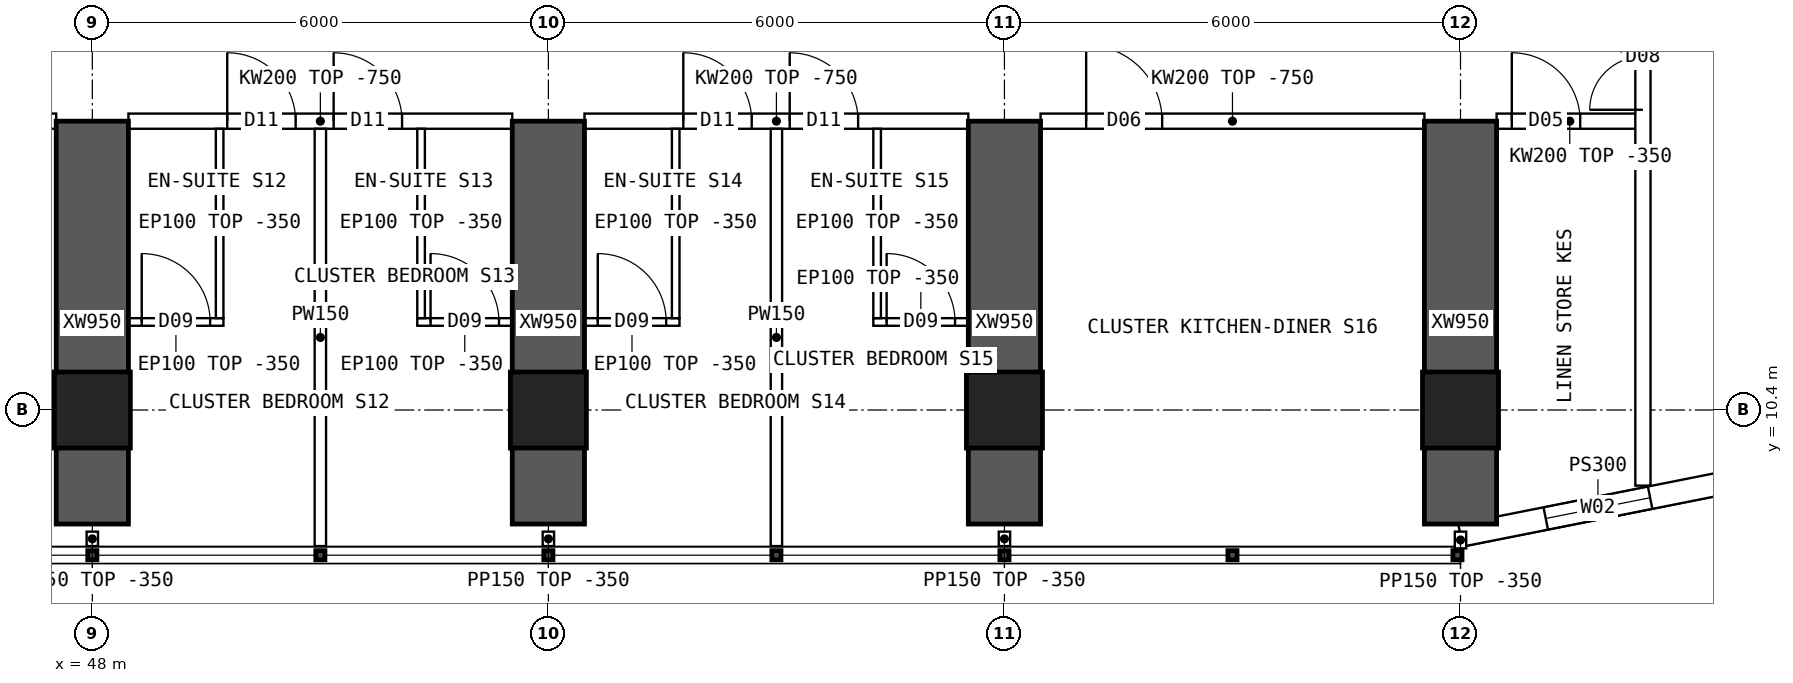
"""IFC4 building model, lengths in metres.
Left out: names, types, materials, properties, quantities, classifications, styles, units other than length and angle.
Written with IfcOpenShell. Run it as: python <this file> out.ifc"""

import sys

from ifc_helpers import new_model, si_unit, direction, frame, frame_2d, origin, origin_2d, place, context, subcontext, project, spatial, polyline, rectangle, hollow_rectangle, outline, extrude, element, fill, save


model = new_model("IFC4")
c1 = context("Model", 3, precision=1e-05, world=origin(), true_north=direction((0.0, 1.0)))
c2 = subcontext(c1, "Body", "Model", "MODEL_VIEW")
j1 = project(units=[si_unit("LENGTHUNIT", "METRE"), si_unit("PLANEANGLEUNIT", "RADIAN")], contexts=[c1])
p1 = place(None, origin())
s1 = spatial("IfcSite", under=j1, at=p1, CompositionType="ELEMENT")
p2 = place(p1, origin())
s2 = spatial("IfcBuilding", under=s1, at=p2, CompositionType="ELEMENT")
p3 = place(p2, frame((0.0, 0.0, 129.4)))
s3 = spatial("IfcBuildingStorey", under=s2, at=p3, CompositionType="ELEMENT", Elevation=129.4)
for number, where, z_axis, x_axis in (
    (1, (48.0, 10.4, 0.0), (0.0, 0.0, 1.0), (1.0, 0.0, 0.0)),
    (2, (54.0, 10.4, 0.0), (0.0, 0.0, 1.0), (1.0, 0.0, 0.0)),
    (3, (60.0, 10.4, 0.0), (0.0, 0.0, 1.0), (1.0, 0.0, 0.0)),
    (4, (66.0, 10.4, 0.0), (0.0, 0.0, 1.0), (1.0, 0.0, 0.0)),
):
    element("IfcColumn", number, at=place(p3, frame(where, z_axis=z_axis, x_axis=x_axis)), inside=s3, PredefinedType="COLUMN", context=c2, shape_type="SweptSolid", body=[
        extrude(hollow_rectangle(XDim=1.0, YDim=1.0, WallThickness=0.1, at=origin_2d()), origin(), (0.0, 0.0, 1.0), 3.75),
    ])
for number, where, z_axis, x_axis in (
    (5, (48.0, 8.9, 0.0), (0.0, 0.0, 1.0), (0.0, 1.0, 0.0)),
    (6, (54.0, 8.9, 0.0), (0.0, 0.0, 1.0), (0.0, 1.0, 0.0)),
    (7, (60.0, 8.9, 0.0), (0.0, 0.0, 1.0), (0.0, 1.0, 0.0)),
    (8, (66.0, 8.9, 0.0), (0.0, 0.0, 1.0), (0.0, 1.0, 0.0)),
):
    element("IfcWall", number, at=place(p3, frame(where, z_axis=z_axis, x_axis=x_axis)), inside=s3, PredefinedType="SHEAR", context=c2, shape_type="SweptSolid", body=[
        extrude(rectangle(XDim=5.3, YDim=0.95, at=frame_2d((2.65, 0.0))), origin(), (0.0, 0.0, 1.0), 3.75),
    ])
p4 = place(p3, frame((66.0, 8.75, 0.0), z_axis=(0.0, 0.0, 1.0), x_axis=(0.980791473772, 0.195059183267, 0.0)))
e9 = element("IfcWall", 9, at=p4, inside=s3, PredefinedType="SOLIDWALL", context=c2, shape_type="SweptSolid", body=[
    extrude(outline(polyline([(-0.03, -0.15), (3.717, -0.15), (3.657, 0.15), (0.03, 0.15), (-0.03, -0.15)])), origin(), (0.0, 0.0, 1.0), 3.4),
])
p5 = place(p4, frame((1.144, 0.0, 0.9)))
e10 = element("IfcOpeningElement", 10, at=p5, cuts=e9, PredefinedType="OPENING", context=c2, shape_type="SweptSolid", body=[
    extrude(rectangle(XDim=1.4, YDim=1.8, at=frame_2d((0.7, 0.9))), frame((0.0, 0.16, 0.0), z_axis=(0.0, -1.0, 0.0), x_axis=(1.0, 0.0, 0.0)), (0.0, 0.0, 1.0), 0.32),
])
p6 = place(p3, frame((42.475, 14.2, 0.0), z_axis=(0.0, 0.0, 1.0), x_axis=(1.0, 0.0, 0.0)))
e11 = element("IfcWall", 11, at=p6, inside=s3, PredefinedType="SOLIDWALL", context=c2, shape_type="SweptSolid", body=[
    extrude(outline(polyline([(0.0, 0.0), (5.05, 0.0), (5.05, 3.0), (0.0, 3.0), (0.0, 0.0)])), frame((0.0, 0.1, 0.0), z_axis=(0.0, -1.0, 0.0), x_axis=(1.0, 0.0, 0.0)), (0.0, 0.0, 1.0), 0.2),
])
p7 = place(p6, frame((0.6, 0.0, 0.0)))
e12 = element("IfcOpeningElement", 12, at=p7, cuts=e11, PredefinedType="OPENING", context=c2, shape_type="SweptSolid", body=[
    extrude(rectangle(XDim=1.0, YDim=2.1, at=frame_2d((0.5, 1.05))), frame((0.0, 0.11, 0.0), z_axis=(0.0, -1.0, 0.0), x_axis=(1.0, 0.0, 0.0)), (0.0, 0.0, 1.0), 0.22),
])
p8 = place(p3, frame((48.475, 14.2, 0.0), z_axis=(0.0, 0.0, 1.0), x_axis=(1.0, 0.0, 0.0)))
e13 = element("IfcWall", 13, at=p8, inside=s3, PredefinedType="SOLIDWALL", context=c2, shape_type="SweptSolid", body=[
    extrude(outline(polyline([(0.0, 0.0), (5.05, 0.0), (5.05, 3.0), (0.0, 3.0), (0.0, 0.0)])), frame((0.0, 0.1, 0.0), z_axis=(0.0, -1.0, 0.0), x_axis=(1.0, 0.0, 0.0)), (0.0, 0.0, 1.0), 0.2),
])
p9 = place(p8, frame((1.3, 0.0, 0.0)))
e14 = element("IfcOpeningElement", 14, at=p9, cuts=e13, PredefinedType="OPENING", context=c2, shape_type="SweptSolid", body=[
    extrude(rectangle(XDim=0.9, YDim=2.1, at=frame_2d((0.45, 1.05))), frame((0.0, 0.11, 0.0), z_axis=(0.0, -1.0, 0.0), x_axis=(1.0, 0.0, 0.0)), (0.0, 0.0, 1.0), 0.22),
])
p10 = place(p8, frame((2.7, 0.0, 0.0)))
e15 = element("IfcOpeningElement", 15, at=p10, cuts=e13, PredefinedType="OPENING", context=c2, shape_type="SweptSolid", body=[
    extrude(rectangle(XDim=0.9, YDim=2.1, at=frame_2d((0.45, 1.05))), frame((0.0, 0.11, 0.0), z_axis=(0.0, -1.0, 0.0), x_axis=(1.0, 0.0, 0.0)), (0.0, 0.0, 1.0), 0.22),
])
p11 = place(p3, frame((54.475, 14.2, 0.0), z_axis=(0.0, 0.0, 1.0), x_axis=(1.0, 0.0, 0.0)))
e16 = element("IfcWall", 16, at=p11, inside=s3, PredefinedType="SOLIDWALL", context=c2, shape_type="SweptSolid", body=[
    extrude(outline(polyline([(0.0, 0.0), (5.05, 0.0), (5.05, 3.0), (0.0, 3.0), (0.0, 0.0)])), frame((0.0, 0.1, 0.0), z_axis=(0.0, -1.0, 0.0), x_axis=(1.0, 0.0, 0.0)), (0.0, 0.0, 1.0), 0.2),
])
p12 = place(p11, frame((1.3, 0.0, 0.0)))
e17 = element("IfcOpeningElement", 17, at=p12, cuts=e16, PredefinedType="OPENING", context=c2, shape_type="SweptSolid", body=[
    extrude(rectangle(XDim=0.9, YDim=2.1, at=frame_2d((0.45, 1.05))), frame((0.0, 0.11, 0.0), z_axis=(0.0, -1.0, 0.0), x_axis=(1.0, 0.0, 0.0)), (0.0, 0.0, 1.0), 0.22),
])
p13 = place(p11, frame((2.7, 0.0, 0.0)))
e18 = element("IfcOpeningElement", 18, at=p13, cuts=e16, PredefinedType="OPENING", context=c2, shape_type="SweptSolid", body=[
    extrude(rectangle(XDim=0.9, YDim=2.1, at=frame_2d((0.45, 1.05))), frame((0.0, 0.11, 0.0), z_axis=(0.0, -1.0, 0.0), x_axis=(1.0, 0.0, 0.0)), (0.0, 0.0, 1.0), 0.22),
])
p14 = place(p3, frame((60.475, 14.2, 0.0), z_axis=(0.0, 0.0, 1.0), x_axis=(1.0, 0.0, 0.0)))
e19 = element("IfcWall", 19, at=p14, inside=s3, PredefinedType="SOLIDWALL", context=c2, shape_type="SweptSolid", body=[
    extrude(outline(polyline([(0.0, 0.0), (5.05, 0.0), (5.05, 3.0), (0.0, 3.0), (0.0, 0.0)])), frame((0.0, 0.1, 0.0), z_axis=(0.0, -1.0, 0.0), x_axis=(1.0, 0.0, 0.0)), (0.0, 0.0, 1.0), 0.2),
])
p15 = place(p14, frame((0.6, 0.0, 0.0)))
e20 = element("IfcOpeningElement", 20, at=p15, cuts=e19, PredefinedType="OPENING", context=c2, shape_type="SweptSolid", body=[
    extrude(rectangle(XDim=1.0, YDim=2.1, at=frame_2d((0.5, 1.05))), frame((0.0, 0.11, 0.0), z_axis=(0.0, -1.0, 0.0), x_axis=(1.0, 0.0, 0.0)), (0.0, 0.0, 1.0), 0.22),
])
p16 = place(p3, frame((66.475, 14.2, 0.0), z_axis=(0.0, 0.0, 1.0), x_axis=(1.0, 0.0, 0.0)))
e21 = element("IfcWall", 21, at=p16, inside=s3, PredefinedType="SOLIDWALL", context=c2, shape_type="SweptSolid", body=[
    extrude(rectangle(XDim=1.925, YDim=0.2, at=frame_2d((0.962, 0.0))), origin(), (0.0, 0.0, 1.0), 3.4),
])
p17 = place(p16, frame((0.2, 0.0, 0.0)))
e22 = element("IfcOpeningElement", 22, at=p17, cuts=e21, PredefinedType="OPENING", context=c2, shape_type="SweptSolid", body=[
    extrude(rectangle(XDim=0.9, YDim=2.1, at=frame_2d((0.45, 1.05))), frame((0.0, 0.11, 0.0), z_axis=(0.0, -1.0, 0.0), x_axis=(1.0, 0.0, 0.0)), (0.0, 0.0, 1.0), 0.22),
])
p18 = place(p3, frame((51.0, 8.61, 0.0), z_axis=(0.0, 0.0, 1.0), x_axis=(0.0, 1.0, 0.0)))
e23 = element("IfcWall", 23, at=p18, inside=s3, PredefinedType="PARTITIONING", context=c2, shape_type="SweptSolid", body=[
    extrude(outline(polyline([(0.0, 0.0), (5.49, 0.0), (5.49, 3.0), (5.442, 3.0), (5.44, 3.4), (1.992, 3.4), (1.99, 3.0), (1.592, 3.0), (1.59, 3.4), (0.0, 3.4), (0.0, 0.0)])), frame((0.0, 0.075, 0.0), z_axis=(0.0, -1.0, 0.0), x_axis=(1.0, 0.0, 0.0)), (0.0, 0.0, 1.0), 0.15),
])
p19 = place(p3, frame((49.725, 11.558, 0.0), z_axis=(0.0, 0.0, 1.0), x_axis=(-1.0, 0.0, 0.0)))
e24 = element("IfcWall", 24, at=p19, inside=s3, PredefinedType="PARTITIONING", context=c2, shape_type="SweptSolid", body=[
    extrude(rectangle(XDim=1.25, YDim=0.1, at=frame_2d((0.625, 0.0))), origin(), (0.0, 0.0, 1.0), 3.4),
])
p20 = place(p19, frame((0.175, 0.0, 0.0)))
e25 = element("IfcOpeningElement", 25, at=p20, cuts=e24, PredefinedType="OPENING", context=c2, shape_type="SweptSolid", body=[
    extrude(rectangle(XDim=0.9, YDim=2.1, at=frame_2d((0.45, 1.05))), frame((0.0, 0.06, 0.0), z_axis=(0.0, -1.0, 0.0), x_axis=(1.0, 0.0, 0.0)), (0.0, 0.0, 1.0), 0.12),
])
p21 = place(p3, frame((49.675, 11.608, 0.0), z_axis=(0.0, 0.0, 1.0), x_axis=(0.0, 1.0, 0.0)))
e26 = element("IfcWall", 26, at=p21, inside=s3, PredefinedType="PARTITIONING", context=c2, shape_type="SweptSolid", body=[
    extrude(outline(polyline([(0.0, 0.0), (2.492, 0.0), (2.492, 3.0), (2.444, 3.0), (2.442, 3.4), (0.0, 3.4), (0.0, 0.0)])), frame((0.0, 0.05, 0.0), z_axis=(0.0, -1.0, 0.0), x_axis=(1.0, 0.0, 0.0)), (0.0, 0.0, 1.0), 0.1),
])
p22 = place(p3, frame((53.525, 11.558, 0.0), z_axis=(0.0, 0.0, 1.0), x_axis=(-1.0, 0.0, 0.0)))
e27 = element("IfcWall", 27, at=p22, inside=s3, PredefinedType="PARTITIONING", context=c2, shape_type="SweptSolid", body=[
    extrude(rectangle(XDim=1.25, YDim=0.1, at=frame_2d((0.625, 0.0))), origin(), (0.0, 0.0, 1.0), 3.4),
])
p23 = place(p22, frame((0.175, 0.0, 0.0)))
e28 = element("IfcOpeningElement", 28, at=p23, cuts=e27, PredefinedType="OPENING", context=c2, shape_type="SweptSolid", body=[
    extrude(rectangle(XDim=0.9, YDim=2.1, at=frame_2d((0.45, 1.05))), frame((0.0, 0.06, 0.0), z_axis=(0.0, -1.0, 0.0), x_axis=(1.0, 0.0, 0.0)), (0.0, 0.0, 1.0), 0.12),
])
p24 = place(p3, frame((52.325, 11.608, 0.0), z_axis=(0.0, 0.0, 1.0), x_axis=(0.0, 1.0, 0.0)))
e29 = element("IfcWall", 29, at=p24, inside=s3, PredefinedType="PARTITIONING", context=c2, shape_type="SweptSolid", body=[
    extrude(outline(polyline([(0.0, 0.0), (2.492, 0.0), (2.492, 3.0), (2.444, 3.0), (2.442, 3.4), (0.0, 3.4), (0.0, 0.0)])), frame((0.0, 0.05, 0.0), z_axis=(0.0, -1.0, 0.0), x_axis=(1.0, 0.0, 0.0)), (0.0, 0.0, 1.0), 0.1),
])
p25 = place(p3, frame((57.0, 8.61, 0.0), z_axis=(0.0, 0.0, 1.0), x_axis=(0.0, 1.0, 0.0)))
e30 = element("IfcWall", 30, at=p25, inside=s3, PredefinedType="PARTITIONING", context=c2, shape_type="SweptSolid", body=[
    extrude(outline(polyline([(0.0, 0.0), (5.49, 0.0), (5.49, 3.0), (5.442, 3.0), (5.44, 3.4), (1.992, 3.4), (1.99, 3.0), (1.592, 3.0), (1.59, 3.4), (0.0, 3.4), (0.0, 0.0)])), frame((0.0, 0.075, 0.0), z_axis=(0.0, -1.0, 0.0), x_axis=(1.0, 0.0, 0.0)), (0.0, 0.0, 1.0), 0.15),
])
p26 = place(p3, frame((55.725, 11.558, 0.0), z_axis=(0.0, 0.0, 1.0), x_axis=(-1.0, 0.0, 0.0)))
e31 = element("IfcWall", 31, at=p26, inside=s3, PredefinedType="PARTITIONING", context=c2, shape_type="SweptSolid", body=[
    extrude(rectangle(XDim=1.25, YDim=0.1, at=frame_2d((0.625, 0.0))), origin(), (0.0, 0.0, 1.0), 3.4),
])
p27 = place(p26, frame((0.175, 0.0, 0.0)))
e32 = element("IfcOpeningElement", 32, at=p27, cuts=e31, PredefinedType="OPENING", context=c2, shape_type="SweptSolid", body=[
    extrude(rectangle(XDim=0.9, YDim=2.1, at=frame_2d((0.45, 1.05))), frame((0.0, 0.06, 0.0), z_axis=(0.0, -1.0, 0.0), x_axis=(1.0, 0.0, 0.0)), (0.0, 0.0, 1.0), 0.12),
])
p28 = place(p3, frame((55.675, 11.608, 0.0), z_axis=(0.0, 0.0, 1.0), x_axis=(0.0, 1.0, 0.0)))
e33 = element("IfcWall", 33, at=p28, inside=s3, PredefinedType="PARTITIONING", context=c2, shape_type="SweptSolid", body=[
    extrude(outline(polyline([(0.0, 0.0), (2.492, 0.0), (2.492, 3.0), (2.444, 3.0), (2.442, 3.4), (0.0, 3.4), (0.0, 0.0)])), frame((0.0, 0.05, 0.0), z_axis=(0.0, -1.0, 0.0), x_axis=(1.0, 0.0, 0.0)), (0.0, 0.0, 1.0), 0.1),
])
p29 = place(p3, frame((59.525, 11.558, 0.0), z_axis=(0.0, 0.0, 1.0), x_axis=(-1.0, 0.0, 0.0)))
e34 = element("IfcWall", 34, at=p29, inside=s3, PredefinedType="PARTITIONING", context=c2, shape_type="SweptSolid", body=[
    extrude(rectangle(XDim=1.25, YDim=0.1, at=frame_2d((0.625, 0.0))), origin(), (0.0, 0.0, 1.0), 3.4),
])
p30 = place(p29, frame((0.175, 0.0, 0.0)))
e35 = element("IfcOpeningElement", 35, at=p30, cuts=e34, PredefinedType="OPENING", context=c2, shape_type="SweptSolid", body=[
    extrude(rectangle(XDim=0.9, YDim=2.1, at=frame_2d((0.45, 1.05))), frame((0.0, 0.06, 0.0), z_axis=(0.0, -1.0, 0.0), x_axis=(1.0, 0.0, 0.0)), (0.0, 0.0, 1.0), 0.12),
])
p31 = place(p3, frame((58.325, 11.608, 0.0), z_axis=(0.0, 0.0, 1.0), x_axis=(0.0, 1.0, 0.0)))
e36 = element("IfcWall", 36, at=p31, inside=s3, PredefinedType="PARTITIONING", context=c2, shape_type="SweptSolid", body=[
    extrude(outline(polyline([(0.0, 0.0), (2.492, 0.0), (2.492, 3.0), (2.444, 3.0), (2.442, 3.4), (0.0, 3.4), (0.0, 0.0)])), frame((0.0, 0.05, 0.0), z_axis=(0.0, -1.0, 0.0), x_axis=(1.0, 0.0, 0.0)), (0.0, 0.0, 1.0), 0.1),
])
p32 = place(p3, frame((68.4, 9.405, 0.0), z_axis=(0.0, 0.0, 1.0), x_axis=(0.0, 1.0, 0.0)))
e37 = element("IfcWall", 37, at=p32, inside=s3, PredefinedType="SOLIDWALL", context=c2, shape_type="SweptSolid", body=[
    extrude(rectangle(XDim=45.189, YDim=0.2, at=frame_2d((22.595, 0.0))), origin(), (0.0, 0.0, 1.0), 3.4),
])
p33 = place(p32, frame((4.945, 0.0, 0.0)))
e38 = element("IfcOpeningElement", 38, at=p33, cuts=e37, PredefinedType="OPENING", context=c2, shape_type="SweptSolid", body=[
    extrude(rectangle(XDim=1.4, YDim=2.1, at=frame_2d((0.7, 1.05))), frame((0.0, 0.11, 0.0), z_axis=(0.0, -1.0, 0.0), x_axis=(1.0, 0.0, 0.0)), (0.0, 0.0, 1.0), 0.22),
])
p34 = place(p32, frame((38.745, 0.0, 0.0)))
e39 = element("IfcOpeningElement", 39, at=p34, cuts=e37, PredefinedType="OPENING", context=c2, shape_type="SweptSolid", body=[
    extrude(rectangle(XDim=1.4, YDim=2.1, at=frame_2d((0.7, 1.05))), frame((0.0, 0.11, 0.0), z_axis=(0.0, -1.0, 0.0), x_axis=(1.0, 0.0, 0.0)), (0.0, 0.0, 1.0), 0.22),
])
for number, where, z_axis, x_axis in (
    (40, (48.0, 8.8, 0.0), (0.0, 0.0, 1.0), (0.0, -1.0, 0.0)),
    (41, (54.0, 8.8, 0.0), (0.0, 0.0, 1.0), (0.0, -1.0, 0.0)),
    (42, (60.0, 8.8, 0.0), (0.0, 0.0, 1.0), (0.0, -1.0, 0.0)),
):
    element("IfcWall", number, at=place(p3, frame(where, z_axis=z_axis, x_axis=x_axis)), inside=s3, PredefinedType="PARTITIONING", context=c2, shape_type="SweptSolid", body=[
        extrude(rectangle(XDim=0.19, YDim=0.15, at=frame_2d((0.095, 0.0))), origin(), (0.0, 0.0, 1.0), 3.4),
    ])
p35 = place(p3, frame((66.0, 8.8, 0.0), z_axis=(0.0, 0.0, 1.0), x_axis=(0.0, -1.0, 0.0)))
e43 = element("IfcWall", 43, at=p35, inside=s3, PredefinedType="PARTITIONING", context=c2, shape_type="SweptSolid", body=[
    extrude(rectangle(XDim=0.22, YDim=0.15, at=frame_2d((0.11, 0.0))), origin(), (0.0, 0.0, 1.0), 3.4),
])
p36 = place(p5, origin())
e44 = element("IfcWindow", 44, at=p36, inside=s3, PartitioningType="SINGLE_PANEL", PredefinedType="WINDOW", context=c2, shape_type="SweptSolid", body=[
    extrude(rectangle(XDim=1.4, YDim=1.8, at=frame_2d((0.7, 0.9))), frame((0.0, 0.03, 0.0), z_axis=(0.0, -1.0, 0.0), x_axis=(1.0, 0.0, 0.0)), (0.0, 0.0, 1.0), 0.06),
])
fill(e10, e44)
p37 = place(p20, origin())
e45 = element("IfcDoor", 45, at=p37, inside=s3, OperationType="SINGLE_SWING_RIGHT", PredefinedType="DOOR", context=c2, shape_type="SweptSolid", body=[
    extrude(rectangle(XDim=0.9, YDim=2.1, at=frame_2d((0.45, 1.05))), frame((0.0, 0.025, 0.0), z_axis=(0.0, -1.0, 0.0), x_axis=(1.0, 0.0, 0.0)), (0.0, 0.0, 1.0), 0.05),
])
fill(e25, e45)
p38 = place(p9, origin())
e46 = element("IfcDoor", 46, at=p38, inside=s3, OperationType="SINGLE_SWING_LEFT", PredefinedType="DOOR", context=c2, shape_type="SweptSolid", body=[
    extrude(rectangle(XDim=0.9, YDim=2.1, at=frame_2d((0.45, 1.05))), frame((0.0, 0.025, 0.0), z_axis=(0.0, -1.0, 0.0), x_axis=(1.0, 0.0, 0.0)), (0.0, 0.0, 1.0), 0.05),
])
fill(e14, e46)
p39 = place(p23, origin())
e47 = element("IfcDoor", 47, at=p39, inside=s3, OperationType="SINGLE_SWING_RIGHT", PredefinedType="DOOR", context=c2, shape_type="SweptSolid", body=[
    extrude(rectangle(XDim=0.9, YDim=2.1, at=frame_2d((0.45, 1.05))), frame((0.0, 0.025, 0.0), z_axis=(0.0, -1.0, 0.0), x_axis=(1.0, 0.0, 0.0)), (0.0, 0.0, 1.0), 0.05),
])
fill(e28, e47)
p40 = place(p10, origin())
e48 = element("IfcDoor", 48, at=p40, inside=s3, OperationType="SINGLE_SWING_LEFT", PredefinedType="DOOR", context=c2, shape_type="SweptSolid", body=[
    extrude(rectangle(XDim=0.9, YDim=2.1, at=frame_2d((0.45, 1.05))), frame((0.0, 0.025, 0.0), z_axis=(0.0, -1.0, 0.0), x_axis=(1.0, 0.0, 0.0)), (0.0, 0.0, 1.0), 0.05),
])
fill(e15, e48)
p41 = place(p27, origin())
e49 = element("IfcDoor", 49, at=p41, inside=s3, OperationType="SINGLE_SWING_RIGHT", PredefinedType="DOOR", context=c2, shape_type="SweptSolid", body=[
    extrude(rectangle(XDim=0.9, YDim=2.1, at=frame_2d((0.45, 1.05))), frame((0.0, 0.025, 0.0), z_axis=(0.0, -1.0, 0.0), x_axis=(1.0, 0.0, 0.0)), (0.0, 0.0, 1.0), 0.05),
])
fill(e32, e49)
p42 = place(p12, origin())
e50 = element("IfcDoor", 50, at=p42, inside=s3, OperationType="SINGLE_SWING_LEFT", PredefinedType="DOOR", context=c2, shape_type="SweptSolid", body=[
    extrude(rectangle(XDim=0.9, YDim=2.1, at=frame_2d((0.45, 1.05))), frame((0.0, 0.025, 0.0), z_axis=(0.0, -1.0, 0.0), x_axis=(1.0, 0.0, 0.0)), (0.0, 0.0, 1.0), 0.05),
])
fill(e17, e50)
p43 = place(p30, origin())
e51 = element("IfcDoor", 51, at=p43, inside=s3, OperationType="SINGLE_SWING_RIGHT", PredefinedType="DOOR", context=c2, shape_type="SweptSolid", body=[
    extrude(rectangle(XDim=0.9, YDim=2.1, at=frame_2d((0.45, 1.05))), frame((0.0, 0.025, 0.0), z_axis=(0.0, -1.0, 0.0), x_axis=(1.0, 0.0, 0.0)), (0.0, 0.0, 1.0), 0.05),
])
fill(e35, e51)
p44 = place(p13, origin())
e52 = element("IfcDoor", 52, at=p44, inside=s3, OperationType="SINGLE_SWING_LEFT", PredefinedType="DOOR", context=c2, shape_type="SweptSolid", body=[
    extrude(rectangle(XDim=0.9, YDim=2.1, at=frame_2d((0.45, 1.05))), frame((0.0, 0.025, 0.0), z_axis=(0.0, -1.0, 0.0), x_axis=(1.0, 0.0, 0.0)), (0.0, 0.0, 1.0), 0.05),
])
fill(e18, e52)
p45 = place(p15, origin())
e53 = element("IfcDoor", 53, at=p45, inside=s3, OperationType="SINGLE_SWING_LEFT", PredefinedType="DOOR", context=c2, shape_type="SweptSolid", body=[
    extrude(rectangle(XDim=1.0, YDim=2.1, at=frame_2d((0.5, 1.05))), frame((0.0, 0.025, 0.0), z_axis=(0.0, -1.0, 0.0), x_axis=(1.0, 0.0, 0.0)), (0.0, 0.0, 1.0), 0.05),
])
fill(e20, e53)
p46 = place(p33, origin())
e54 = element("IfcDoor", 54, at=p46, inside=s3, OperationType="DOUBLE_DOOR_SINGLE_SWING", PredefinedType="DOOR", context=c2, shape_type="SweptSolid", body=[
    extrude(rectangle(XDim=1.4, YDim=2.1, at=frame_2d((0.7, 1.05))), frame((0.0, 0.025, 0.0), z_axis=(0.0, -1.0, 0.0), x_axis=(1.0, 0.0, 0.0)), (0.0, 0.0, 1.0), 0.05),
])
fill(e38, e54)
p47 = place(p17, origin())
e55 = element("IfcDoor", 55, at=p47, inside=s3, OperationType="SINGLE_SWING_LEFT", PredefinedType="DOOR", context=c2, shape_type="SweptSolid", body=[
    extrude(rectangle(XDim=0.9, YDim=2.1, at=frame_2d((0.45, 1.05))), frame((0.0, 0.025, 0.0), z_axis=(0.0, -1.0, 0.0), x_axis=(1.0, 0.0, 0.0)), (0.0, 0.0, 1.0), 0.05),
])
fill(e22, e55)
save(model, sys.argv[1])
